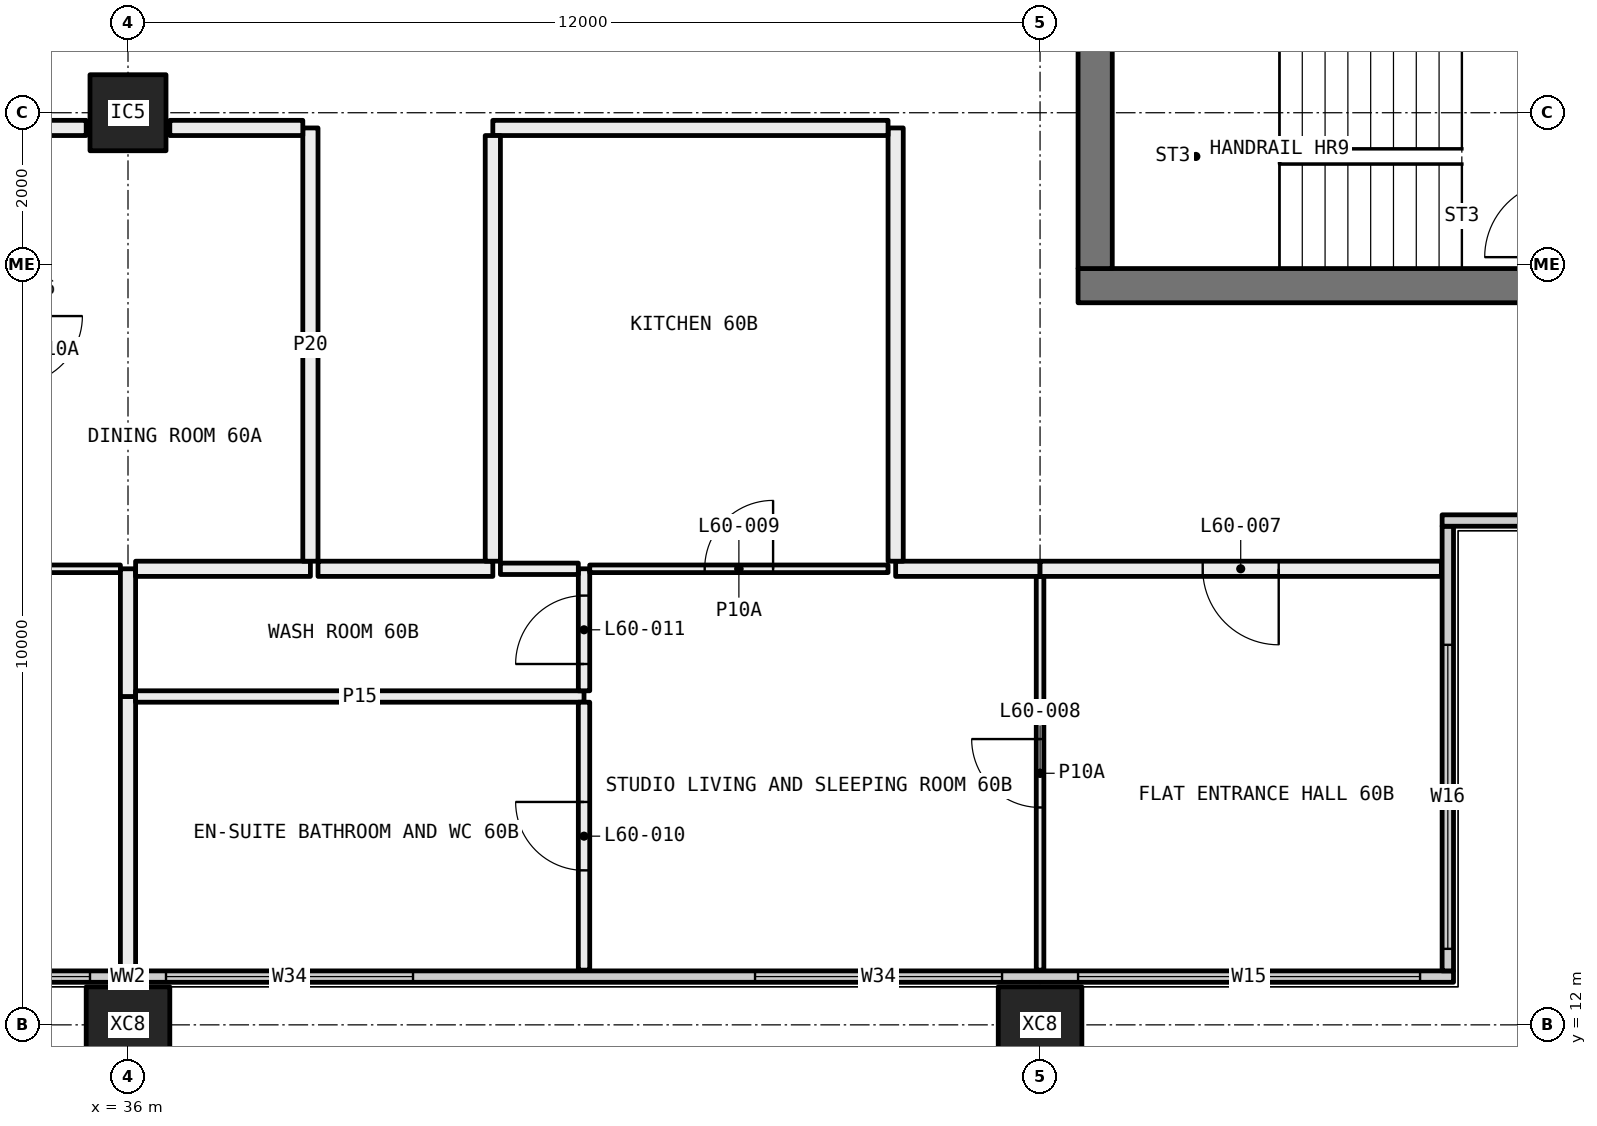
"""IFC4 building model, lengths in metres.
Left out: names, types, materials, properties, quantities, classifications, styles, units other than length and angle.
Written with IfcOpenShell. Run it as: python <this file> out.ifc"""

import sys

from ifc_helpers import new_model, si_unit, direction, frame, frame_2d, origin, origin_2d, place, context, subcontext, project, spatial, rectangle, hollow_rectangle, extrude, element, fill, save


model = new_model("IFC4")
c1 = context("Model", 3, precision=1e-05, world=origin(), true_north=direction((0.0, 1.0)))
c2 = subcontext(c1, "Body", "Model", "MODEL_VIEW")
j1 = project(units=[si_unit("LENGTHUNIT", "METRE"), si_unit("PLANEANGLEUNIT", "RADIAN")], contexts=[c1])
p1 = place(None, origin())
s1 = spatial("IfcSite", under=j1, at=p1, CompositionType="ELEMENT")
p2 = place(p1, origin())
s2 = spatial("IfcBuilding", under=s1, at=p2, CompositionType="ELEMENT")
p3 = place(p2, frame((0.0, 0.0, 224.85)))
s3 = spatial("IfcBuildingStorey", under=s2, at=p3, CompositionType="ELEMENT", Elevation=224.85)
p4 = place(p3, frame((36.0, 12.0, -0.4), z_axis=(0.0, 0.0, 1.0), x_axis=(1.0, 0.0, 0.0)))
e1 = element("IfcColumn", 1, at=p4, inside=s3, PredefinedType="COLUMN", context=c2, shape_type="SweptSolid", body=[
    extrude(hollow_rectangle(XDim=1.1, YDim=1.0, WallThickness=0.04, at=origin_2d()), origin(), (0.0, 0.0, 1.0), 3.45),
])
p5 = place(p3, frame((36.0, 24.0, 0.0), z_axis=(0.0, 0.0, 1.0), x_axis=(1.0, 0.0, 0.0)))
e2 = element("IfcColumn", 2, at=p5, inside=s3, PredefinedType="COLUMN", context=c2, shape_type="SweptSolid", body=[
    extrude(hollow_rectangle(XDim=1.0, YDim=1.0, WallThickness=0.04, at=origin_2d()), origin(), (0.0, 0.0, 1.0), 3.05),
])
p6 = place(p3, frame((48.0, 12.0, -0.4), z_axis=(0.0, 0.0, 1.0), x_axis=(1.0, 0.0, 0.0)))
e3 = element("IfcColumn", 3, at=p6, inside=s3, PredefinedType="COLUMN", context=c2, shape_type="SweptSolid", body=[
    extrude(hollow_rectangle(XDim=1.1, YDim=1.0, WallThickness=0.04, at=origin_2d()), origin(), (0.0, 0.0, 1.0), 3.45),
])
p7 = place(p3, frame((18.56, 12.635, 0.0), z_axis=(0.0, 0.0, 1.0), x_axis=(1.0, 0.0, 0.0)))
e4 = element("IfcWall", 4, at=p7, inside=s3, PredefinedType="ELEMENTEDWALL", context=c2, shape_type="SweptSolid", body=[
    extrude(rectangle(XDim=34.88, YDim=0.15, at=frame_2d((17.44, 0.0))), origin(), (0.0, 0.0, 1.0), 3.05),
])
p8 = place(p7, frame((0.44, 0.0, 0.45)))
e5 = element("IfcOpeningElement", 5, at=p8, cuts=e4, PredefinedType="OPENING", context=c2, shape_type="SweptSolid", body=[
    extrude(rectangle(XDim=4.5, YDim=2.55, at=frame_2d((2.25, 1.275))), frame((0.0, 0.085, 0.0), z_axis=(0.0, -1.0, 0.0), x_axis=(1.0, 0.0, 0.0)), (0.0, 0.0, 1.0), 0.17),
])
p9 = place(p7, frame((5.94, 0.0, 0.45)))
e6 = element("IfcOpeningElement", 6, at=p9, cuts=e4, PredefinedType="OPENING", context=c2, shape_type="SweptSolid", body=[
    extrude(rectangle(XDim=3.25, YDim=2.55, at=frame_2d((1.625, 1.275))), frame((0.0, 0.085, 0.0), z_axis=(0.0, -1.0, 0.0), x_axis=(1.0, 0.0, 0.0)), (0.0, 0.0, 1.0), 0.17),
])
p10 = place(p7, frame((14.94, 0.0, 0.45)))
e7 = element("IfcOpeningElement", 7, at=p10, cuts=e4, PredefinedType="OPENING", context=c2, shape_type="SweptSolid", body=[
    extrude(rectangle(XDim=2.0, YDim=2.55, at=frame_2d((1.0, 1.275))), frame((0.0, 0.085, 0.0), z_axis=(0.0, -1.0, 0.0), x_axis=(1.0, 0.0, 0.0)), (0.0, 0.0, 1.0), 0.17),
])
p11 = place(p7, frame((17.94, 0.0, 0.45)))
e8 = element("IfcOpeningElement", 8, at=p11, cuts=e4, PredefinedType="OPENING", context=c2, shape_type="SweptSolid", body=[
    extrude(rectangle(XDim=3.25, YDim=2.55, at=frame_2d((1.625, 1.275))), frame((0.0, 0.085, 0.0), z_axis=(0.0, -1.0, 0.0), x_axis=(1.0, 0.0, 0.0)), (0.0, 0.0, 1.0), 0.17),
])
p12 = place(p7, frame((25.69, 0.0, 0.45)))
e9 = element("IfcOpeningElement", 9, at=p12, cuts=e4, PredefinedType="OPENING", context=c2, shape_type="SweptSolid", body=[
    extrude(rectangle(XDim=3.25, YDim=2.55, at=frame_2d((1.625, 1.275))), frame((0.0, 0.085, 0.0), z_axis=(0.0, -1.0, 0.0), x_axis=(1.0, 0.0, 0.0)), (0.0, 0.0, 1.0), 0.17),
])
p13 = place(p7, frame((29.94, 0.0, 0.45)))
e10 = element("IfcOpeningElement", 10, at=p13, cuts=e4, PredefinedType="OPENING", context=c2, shape_type="SweptSolid", body=[
    extrude(rectangle(XDim=4.5, YDim=2.55, at=frame_2d((2.25, 1.275))), frame((0.0, 0.085, 0.0), z_axis=(0.0, -1.0, 0.0), x_axis=(1.0, 0.0, 0.0)), (0.0, 0.0, 1.0), 0.17),
])
p14 = place(p3, frame((53.365, 12.71, 0.0), z_axis=(0.0, 0.0, 1.0), x_axis=(0.0, 1.0, 0.0)))
e11 = element("IfcWall", 11, at=p14, inside=s3, PredefinedType="ELEMENTEDWALL", context=c2, shape_type="SweptSolid", body=[
    extrude(rectangle(XDim=5.85, YDim=0.15, at=frame_2d((2.925, 0.0))), origin(), (0.0, 0.0, 1.0), 3.05),
])
p15 = place(p14, frame((0.29, 0.0, 0.45)))
e12 = element("IfcOpeningElement", 12, at=p15, cuts=e11, PredefinedType="OPENING", context=c2, shape_type="SweptSolid", body=[
    extrude(rectangle(XDim=4.0, YDim=2.55, at=frame_2d((2.0, 1.275))), frame((0.0, 0.085, 0.0), z_axis=(0.0, -1.0, 0.0), x_axis=(1.0, 0.0, 0.0)), (0.0, 0.0, 1.0), 0.17),
])
p16 = place(p3, frame((53.29, 18.635, 0.0), z_axis=(0.0, 0.0, 1.0), x_axis=(1.0, 0.0, 0.0)))
e13 = element("IfcWall", 13, at=p16, inside=s3, PredefinedType="ELEMENTEDWALL", context=c2, shape_type="SweptSolid", body=[
    extrude(rectangle(XDim=6.15, YDim=0.15, at=frame_2d((3.075, 0.0))), origin(), (0.0, 0.0, 1.0), 3.05),
])
p17 = place(p16, frame((1.71, 0.0, 0.45)))
e14 = element("IfcOpeningElement", 14, at=p17, cuts=e13, PredefinedType="OPENING", context=c2, shape_type="SweptSolid", body=[
    extrude(rectangle(XDim=4.0, YDim=2.55, at=frame_2d((2.0, 1.275))), frame((0.0, 0.085, 0.0), z_axis=(0.0, -1.0, 0.0), x_axis=(1.0, 0.0, 0.0)), (0.0, 0.0, 1.0), 0.17),
])
p18 = place(p3, frame((35.9, 18.0, 0.0), z_axis=(0.0, 0.0, 1.0), x_axis=(-1.0, 0.0, 0.0)))
e15 = element("IfcWall", 15, at=p18, inside=s3, PredefinedType="PARTITIONING", context=c2, shape_type="SweptSolid", body=[
    extrude(rectangle(XDim=1.4, YDim=0.1, at=frame_2d((0.7, 0.0))), origin(), (0.0, 0.0, 1.0), 3.05),
])
p19 = place(p3, frame((36.0, 12.72, 0.0), z_axis=(0.0, 0.0, 1.0), x_axis=(0.0, 1.0, 0.0)))
e16 = element("IfcWall", 16, at=p19, inside=s3, PredefinedType="PARTITIONING", context=c2, shape_type="SweptSolid", body=[
    extrude(rectangle(XDim=3.6, YDim=0.2, at=frame_2d((1.8, 0.0))), origin(), (0.0, 0.0, 1.0), 2.45),
])
p20 = place(p3, frame((36.0, 16.32, 0.0), z_axis=(0.0, 0.0, 1.0), x_axis=(0.0, 1.0, 0.0)))
e17 = element("IfcWall", 17, at=p20, inside=s3, PredefinedType="PARTITIONING", context=c2, shape_type="SweptSolid", body=[
    extrude(rectangle(XDim=1.68, YDim=0.2, at=frame_2d((0.84, 0.0))), origin(), (0.0, 0.0, 1.0), 2.45),
])
p21 = place(p3, frame((36.1, 18.0, 0.0), z_axis=(0.0, 0.0, 1.0), x_axis=(1.0, 0.0, 0.0)))
e18 = element("IfcWall", 18, at=p21, inside=s3, PredefinedType="PARTITIONING", context=c2, shape_type="SweptSolid", body=[
    extrude(rectangle(XDim=2.3, YDim=0.2, at=frame_2d((1.15, 0.0))), origin(), (0.0, 0.0, 1.0), 3.05),
])
p22 = place(p3, frame((35.45, 23.8, 0.0), z_axis=(0.0, 0.0, 1.0), x_axis=(-1.0, 0.0, 0.0)))
e19 = element("IfcWall", 19, at=p22, inside=s3, PredefinedType="PARTITIONING", context=c2, shape_type="SweptSolid", body=[
    extrude(rectangle(XDim=0.95, YDim=0.2, at=frame_2d((0.475, 0.0))), origin(), (0.0, 0.0, 1.0), 3.05),
])
p23 = place(p3, frame((38.4, 18.1, 0.0), z_axis=(0.0, 0.0, 1.0), x_axis=(0.0, 1.0, 0.0)))
e20 = element("IfcWall", 20, at=p23, inside=s3, PredefinedType="PARTITIONING", context=c2, shape_type="SweptSolid", body=[
    extrude(rectangle(XDim=5.7, YDim=0.2, at=frame_2d((2.85, 0.0))), origin(), (0.0, 0.0, 1.0), 3.05),
])
p24 = place(p3, frame((38.3, 23.8, 0.0), z_axis=(0.0, 0.0, 1.0), x_axis=(-1.0, 0.0, 0.0)))
e21 = element("IfcWall", 21, at=p24, inside=s3, PredefinedType="PARTITIONING", context=c2, shape_type="SweptSolid", body=[
    extrude(rectangle(XDim=1.75, YDim=0.2, at=frame_2d((0.875, 0.0))), origin(), (0.0, 0.0, 1.0), 3.05),
])
p25 = place(p3, frame((42.0, 16.32, 0.0), z_axis=(0.0, 0.0, 1.0), x_axis=(-1.0, 0.0, 0.0)))
e22 = element("IfcWall", 22, at=p25, inside=s3, PredefinedType="PARTITIONING", context=c2, shape_type="SweptSolid", body=[
    extrude(rectangle(XDim=5.9, YDim=0.15, at=frame_2d((2.95, 0.0))), origin(), (0.0, 0.0, 1.0), 3.05),
])
p26 = place(p3, frame((42.0, 12.72, 0.0), z_axis=(0.0, 0.0, 1.0), x_axis=(0.0, 1.0, 0.0)))
e23 = element("IfcWall", 23, at=p26, inside=s3, PredefinedType="PARTITIONING", context=c2, shape_type="SweptSolid", body=[
    extrude(rectangle(XDim=3.525, YDim=0.15, at=frame_2d((1.763, 0.0))), origin(), (0.0, 0.0, 1.0), 3.05),
])
p27 = place(p26, frame((1.312, 0.0, 0.0)))
e24 = element("IfcOpeningElement", 24, at=p27, cuts=e23, PredefinedType="OPENING", context=c2, shape_type="SweptSolid", body=[
    extrude(rectangle(XDim=0.9, YDim=2.1, at=frame_2d((0.45, 1.05))), frame((0.0, 0.085, 0.0), z_axis=(0.0, -1.0, 0.0), x_axis=(1.0, 0.0, 0.0)), (0.0, 0.0, 1.0), 0.17),
])
p28 = place(p3, frame((42.0, 16.395, 0.0), z_axis=(0.0, 0.0, 1.0), x_axis=(0.0, 1.0, 0.0)))
e25 = element("IfcWall", 25, at=p28, inside=s3, PredefinedType="PARTITIONING", context=c2, shape_type="SweptSolid", body=[
    extrude(rectangle(XDim=1.605, YDim=0.15, at=frame_2d((0.802, 0.0))), origin(), (0.0, 0.0, 1.0), 3.05),
])
p29 = place(p28, frame((0.353, 0.0, 0.0)))
e26 = element("IfcOpeningElement", 26, at=p29, cuts=e25, PredefinedType="OPENING", context=c2, shape_type="SweptSolid", body=[
    extrude(rectangle(XDim=0.9, YDim=2.1, at=frame_2d((0.45, 1.05))), frame((0.0, 0.085, 0.0), z_axis=(0.0, -1.0, 0.0), x_axis=(1.0, 0.0, 0.0)), (0.0, 0.0, 1.0), 0.17),
])
p30 = place(p3, frame((41.925, 18.0, 0.0), z_axis=(0.0, 0.0, 1.0), x_axis=(-1.0, 0.0, 0.0)))
e27 = element("IfcWall", 27, at=p30, inside=s3, PredefinedType="PARTITIONING", context=c2, shape_type="SweptSolid", body=[
    extrude(rectangle(XDim=1.025, YDim=0.15, at=frame_2d((0.513, 0.0))), origin(), (0.0, 0.0, 1.0), 3.05),
])
p31 = place(p3, frame((40.8, 18.0, 0.0), z_axis=(0.0, 0.0, 1.0), x_axis=(-1.0, 0.0, 0.0)))
e28 = element("IfcWall", 28, at=p31, inside=s3, PredefinedType="PARTITIONING", context=c2, shape_type="SweptSolid", body=[
    extrude(rectangle(XDim=2.3, YDim=0.2, at=frame_2d((1.15, 0.0))), origin(), (0.0, 0.0, 1.0), 3.05),
])
p32 = place(p3, frame((48.0, 12.72, 0.0), z_axis=(0.0, 0.0, 1.0), x_axis=(0.0, 1.0, 0.0)))
e29 = element("IfcWall", 29, at=p32, inside=s3, PredefinedType="PARTITIONING", context=c2, shape_type="SweptSolid", body=[
    extrude(rectangle(XDim=5.18, YDim=0.1, at=frame_2d((2.59, 0.0))), origin(), (0.0, 0.0, 1.0), 3.05),
])
p33 = place(p32, frame((2.14, 0.0, 0.0)))
e30 = element("IfcOpeningElement", 30, at=p33, cuts=e29, PredefinedType="OPENING", context=c2, shape_type="SweptSolid", body=[
    extrude(rectangle(XDim=0.9, YDim=2.1, at=frame_2d((0.45, 1.05))), frame((0.0, 0.06, 0.0), z_axis=(0.0, -1.0, 0.0), x_axis=(1.0, 0.0, 0.0)), (0.0, 0.0, 1.0), 0.12),
])
p34 = place(p3, frame((46.0, 18.0, 0.0), z_axis=(0.0, 0.0, 1.0), x_axis=(-1.0, 0.0, 0.0)))
e31 = element("IfcWall", 31, at=p34, inside=s3, PredefinedType="PARTITIONING", context=c2, shape_type="SweptSolid", body=[
    extrude(rectangle(XDim=3.925, YDim=0.1, at=frame_2d((1.962, 0.0))), origin(), (0.0, 0.0, 1.0), 3.05),
])
p35 = place(p34, frame((1.512, 0.0, 0.0)))
e32 = element("IfcOpeningElement", 32, at=p35, cuts=e31, PredefinedType="OPENING", context=c2, shape_type="SweptSolid", body=[
    extrude(rectangle(XDim=0.9, YDim=2.1, at=frame_2d((0.45, 1.05))), frame((0.0, 0.06, 0.0), z_axis=(0.0, -1.0, 0.0), x_axis=(1.0, 0.0, 0.0)), (0.0, 0.0, 1.0), 0.12),
])
p36 = place(p3, frame((48.0, 18.0, 0.0), z_axis=(0.0, 0.0, 1.0), x_axis=(-1.0, 0.0, 0.0)))
e33 = element("IfcWall", 33, at=p36, inside=s3, PredefinedType="PARTITIONING", context=c2, shape_type="SweptSolid", body=[
    extrude(rectangle(XDim=1.9, YDim=0.2, at=frame_2d((0.95, 0.0))), origin(), (0.0, 0.0, 1.0), 3.05),
])
p37 = place(p3, frame((53.28, 18.0, 0.0), z_axis=(0.0, 0.0, 1.0), x_axis=(-1.0, 0.0, 0.0)))
e34 = element("IfcWall", 34, at=p37, inside=s3, PredefinedType="PARTITIONING", context=c2, shape_type="SweptSolid", body=[
    extrude(rectangle(XDim=5.28, YDim=0.2, at=frame_2d((2.64, 0.0))), origin(), (0.0, 0.0, 1.0), 3.05),
])
p38 = place(p37, frame((2.14, 0.0, 0.0)))
e35 = element("IfcOpeningElement", 35, at=p38, cuts=e34, PredefinedType="OPENING", context=c2, shape_type="SweptSolid", body=[
    extrude(rectangle(XDim=1.0, YDim=2.1, at=frame_2d((0.5, 1.05))), frame((0.0, 0.11, 0.0), z_axis=(0.0, -1.0, 0.0), x_axis=(1.0, 0.0, 0.0)), (0.0, 0.0, 1.0), 0.22),
])
p39 = place(p3, frame((46.1, 18.1, 0.0), z_axis=(0.0, 0.0, 1.0), x_axis=(0.0, 1.0, 0.0)))
e36 = element("IfcWall", 36, at=p39, inside=s3, PredefinedType="PARTITIONING", context=c2, shape_type="SweptSolid", body=[
    extrude(rectangle(XDim=5.7, YDim=0.2, at=frame_2d((2.85, 0.0))), origin(), (0.0, 0.0, 1.0), 3.05),
])
p40 = place(p3, frame((46.0, 23.8, 0.0), z_axis=(0.0, 0.0, 1.0), x_axis=(-1.0, 0.0, 0.0)))
e37 = element("IfcWall", 37, at=p40, inside=s3, PredefinedType="PARTITIONING", context=c2, shape_type="SweptSolid", body=[
    extrude(rectangle(XDim=5.2, YDim=0.2, at=frame_2d((2.6, 0.0))), origin(), (0.0, 0.0, 1.0), 3.05),
])
p41 = place(p3, frame((40.8, 23.7, 0.0), z_axis=(0.0, 0.0, 1.0), x_axis=(0.0, -1.0, 0.0)))
e38 = element("IfcWall", 38, at=p41, inside=s3, PredefinedType="PARTITIONING", context=c2, shape_type="SweptSolid", body=[
    extrude(rectangle(XDim=5.6, YDim=0.2, at=frame_2d((2.8, 0.0))), origin(), (0.0, 0.0, 1.0), 3.05),
])
p42 = place(p3, frame((59.5, 21.725, 0.0), z_axis=(0.0, 0.0, 1.0), x_axis=(-1.0, 0.0, 0.0)))
e39 = element("IfcWall", 39, at=p42, inside=s3, PredefinedType="SHEAR", context=c2, shape_type="SweptSolid", body=[
    extrude(rectangle(XDim=11.0, YDim=0.45, at=frame_2d((5.5, 0.0))), origin(), (0.0, 0.0, 1.0), 3.05),
])
p43 = place(p42, frame((1.125, 0.0, 0.0)))
e40 = element("IfcOpeningElement", 40, at=p43, cuts=e39, PredefinedType="OPENING", context=c2, shape_type="SweptSolid", body=[
    extrude(rectangle(XDim=1.0, YDim=2.1, at=frame_2d((0.5, 1.05))), frame((0.0, 0.235, 0.0), z_axis=(0.0, -1.0, 0.0), x_axis=(1.0, 0.0, 0.0)), (0.0, 0.0, 1.0), 0.47),
])
p44 = place(p3, frame((48.725, 21.95, 0.0), z_axis=(0.0, 0.0, 1.0), x_axis=(0.0, 1.0, 0.0)))
e41 = element("IfcWall", 41, at=p44, inside=s3, PredefinedType="SHEAR", context=c2, shape_type="SweptSolid", body=[
    extrude(rectangle(XDim=16.1, YDim=0.45, at=frame_2d((8.05, 0.0))), origin(), (0.0, 0.0, 1.0), 3.05),
])
p45 = place(p44, frame((7.25, 0.0, 0.0)))
e42 = element("IfcOpeningElement", 42, at=p45, cuts=e41, PredefinedType="OPENING", context=c2, shape_type="SweptSolid", body=[
    extrude(rectangle(XDim=1.6, YDim=2.1, at=frame_2d((0.8, 1.05))), frame((0.0, 0.235, 0.0), z_axis=(0.0, -1.0, 0.0), x_axis=(1.0, 0.0, 0.0)), (0.0, 0.0, 1.0), 0.47),
])
p46 = place(p10, origin())
e43 = element("IfcWindow", 43, at=p46, inside=s3, PartitioningType="SINGLE_PANEL", PredefinedType="WINDOW", context=c2, shape_type="SweptSolid", body=[
    extrude(rectangle(XDim=2.0, YDim=2.55, at=frame_2d((1.0, 1.275))), frame((0.0, 0.03, 0.0), z_axis=(0.0, -1.0, 0.0), x_axis=(1.0, 0.0, 0.0)), (0.0, 0.0, 1.0), 0.06),
])
fill(e7, e43)
p47 = place(p11, origin())
e44 = element("IfcWindow", 44, at=p47, inside=s3, PartitioningType="SINGLE_PANEL", PredefinedType="WINDOW", context=c2, shape_type="SweptSolid", body=[
    extrude(rectangle(XDim=3.25, YDim=2.55, at=frame_2d((1.625, 1.275))), frame((0.0, 0.03, 0.0), z_axis=(0.0, -1.0, 0.0), x_axis=(1.0, 0.0, 0.0)), (0.0, 0.0, 1.0), 0.06),
])
fill(e8, e44)
p48 = place(p12, origin())
e45 = element("IfcWindow", 45, at=p48, inside=s3, PartitioningType="SINGLE_PANEL", PredefinedType="WINDOW", context=c2, shape_type="SweptSolid", body=[
    extrude(rectangle(XDim=3.25, YDim=2.55, at=frame_2d((1.625, 1.275))), frame((0.0, 0.03, 0.0), z_axis=(0.0, -1.0, 0.0), x_axis=(1.0, 0.0, 0.0)), (0.0, 0.0, 1.0), 0.06),
])
fill(e9, e45)
p49 = place(p13, origin())
e46 = element("IfcWindow", 46, at=p49, inside=s3, PartitioningType="SINGLE_PANEL", PredefinedType="WINDOW", context=c2, shape_type="SweptSolid", body=[
    extrude(rectangle(XDim=4.5, YDim=2.55, at=frame_2d((2.25, 1.275))), frame((0.0, 0.03, 0.0), z_axis=(0.0, -1.0, 0.0), x_axis=(1.0, 0.0, 0.0)), (0.0, 0.0, 1.0), 0.06),
])
fill(e10, e46)
p50 = place(p15, origin())
e47 = element("IfcWindow", 47, at=p50, inside=s3, PartitioningType="SINGLE_PANEL", PredefinedType="WINDOW", context=c2, shape_type="SweptSolid", body=[
    extrude(rectangle(XDim=4.0, YDim=2.55, at=frame_2d((2.0, 1.275))), frame((0.0, 0.03, 0.0), z_axis=(0.0, -1.0, 0.0), x_axis=(1.0, 0.0, 0.0)), (0.0, 0.0, 1.0), 0.06),
])
fill(e12, e47)
p51 = place(p38, origin())
e48 = element("IfcDoor", 48, at=p51, inside=s3, OperationType="SINGLE_SWING_RIGHT", PredefinedType="DOOR", context=c2, shape_type="SweptSolid", body=[
    extrude(rectangle(XDim=1.0, YDim=2.1, at=frame_2d((0.5, 1.05))), frame((0.0, 0.025, 0.0), z_axis=(0.0, -1.0, 0.0), x_axis=(1.0, 0.0, 0.0)), (0.0, 0.0, 1.0), 0.05),
])
fill(e35, e48)
p52 = place(p33, origin())
e49 = element("IfcDoor", 49, at=p52, inside=s3, OperationType="SINGLE_SWING_LEFT", PredefinedType="DOOR", context=c2, shape_type="SweptSolid", body=[
    extrude(rectangle(XDim=0.9, YDim=2.1, at=frame_2d((0.45, 1.05))), frame((0.0, 0.025, 0.0), z_axis=(0.0, -1.0, 0.0), x_axis=(1.0, 0.0, 0.0)), (0.0, 0.0, 1.0), 0.05),
])
fill(e30, e49)
p53 = place(p35, frame((0.9, 0.0, 0.0), x_axis=(-1.0, 0.0, 0.0)))
e50 = element("IfcDoor", 50, at=p53, inside=s3, OperationType="SINGLE_SWING_LEFT", PredefinedType="DOOR", context=c2, shape_type="SweptSolid", body=[
    extrude(rectangle(XDim=0.9, YDim=2.1, at=frame_2d((0.45, 1.05))), frame((0.0, 0.025, 0.0), z_axis=(0.0, -1.0, 0.0), x_axis=(1.0, 0.0, 0.0)), (0.0, 0.0, 1.0), 0.05),
])
fill(e32, e50)
p54 = place(p27, origin())
e51 = element("IfcDoor", 51, at=p54, inside=s3, OperationType="SINGLE_SWING_LEFT", PredefinedType="DOOR", context=c2, shape_type="SweptSolid", body=[
    extrude(rectangle(XDim=0.9, YDim=2.1, at=frame_2d((0.45, 1.05))), frame((0.0, 0.025, 0.0), z_axis=(0.0, -1.0, 0.0), x_axis=(1.0, 0.0, 0.0)), (0.0, 0.0, 1.0), 0.05),
])
fill(e24, e51)
p55 = place(p29, origin())
e52 = element("IfcDoor", 52, at=p55, inside=s3, OperationType="SINGLE_SWING_RIGHT", PredefinedType="DOOR", context=c2, shape_type="SweptSolid", body=[
    extrude(rectangle(XDim=0.9, YDim=2.1, at=frame_2d((0.45, 1.05))), frame((0.0, 0.025, 0.0), z_axis=(0.0, -1.0, 0.0), x_axis=(1.0, 0.0, 0.0)), (0.0, 0.0, 1.0), 0.05),
])
fill(e26, e52)
save(model, sys.argv[1])
